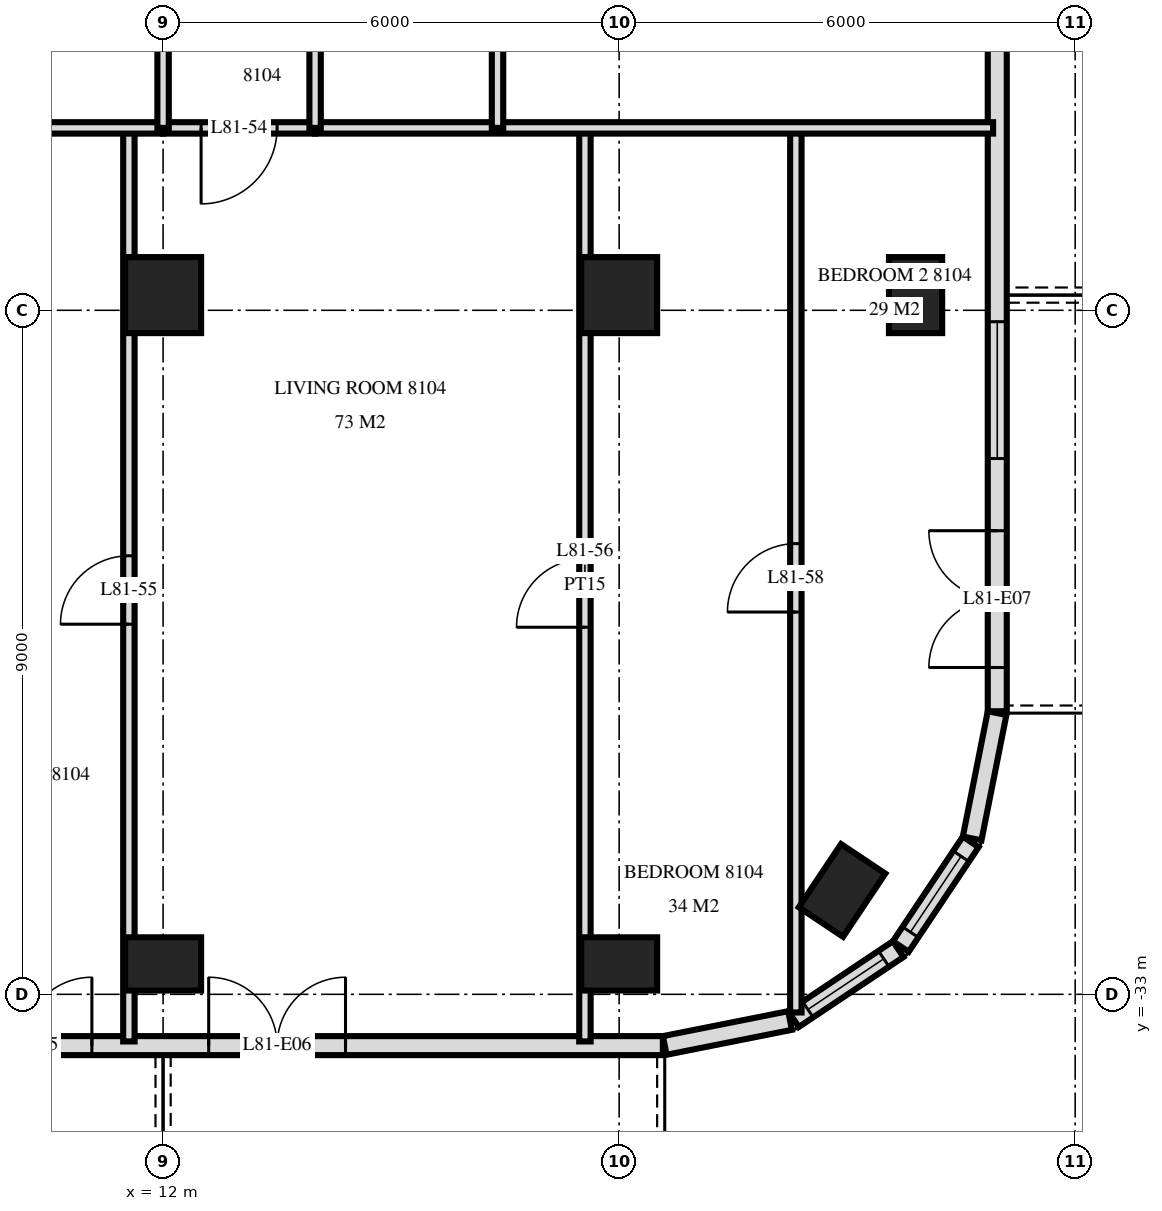
"""IFC4 building model, lengths in metres.
Left out: names, types, materials, properties, quantities, classifications, styles, units other than length and angle.
Written with IfcOpenShell. Run it as: python <this file> out.ifc"""

import sys

from ifc_helpers import new_model, si_unit, direction, frame, frame_2d, origin, origin_2d, place, context, subcontext, project, spatial, rectangle, extrude, element, fill, save


model = new_model("IFC4")
c1 = context("Model", 3, precision=1e-05, world=origin(), true_north=direction((0.0, 1.0)))
c2 = subcontext(c1, "Body", "Model", "MODEL_VIEW")
j1 = project(units=[si_unit("LENGTHUNIT", "METRE"), si_unit("PLANEANGLEUNIT", "RADIAN")], contexts=[c1])
p1 = place(None, origin())
s1 = spatial("IfcSite", under=j1, at=p1, CompositionType="ELEMENT")
p2 = place(p1, origin())
s2 = spatial("IfcBuilding", under=s1, at=p2, CompositionType="ELEMENT")
p3 = place(p2, frame((0.0, 0.0, 305.1)))
s3 = spatial("IfcBuildingStorey", under=s2, at=p3, CompositionType="ELEMENT", Elevation=305.1)
p4 = place(p3, frame((12.0, -32.6, 0.0), z_axis=(0.0, 0.0, 1.0), x_axis=(1.0, 0.0, 0.0)))
e1 = element("IfcColumn", 1, at=p4, inside=s3, PredefinedType="COLUMN", context=c2, shape_type="SweptSolid", body=[
    extrude(rectangle(XDim=1.0, YDim=0.7, at=origin_2d()), origin(), (0.0, 0.0, 1.0), 3.5),
])
p5 = place(p3, frame((12.0, -23.8, 0.0), z_axis=(0.0, 0.0, 1.0), x_axis=(1.0, 0.0, 0.0)))
e2 = element("IfcColumn", 2, at=p5, inside=s3, PredefinedType="COLUMN", context=c2, shape_type="SweptSolid", body=[
    extrude(rectangle(XDim=1.0, YDim=1.0, at=origin_2d()), origin(), (0.0, 0.0, 1.0), 3.5),
])
p6 = place(p3, frame((18.0, -32.6, 0.0), z_axis=(0.0, 0.0, 1.0), x_axis=(1.0, 0.0, 0.0)))
e3 = element("IfcColumn", 3, at=p6, inside=s3, PredefinedType="COLUMN", context=c2, shape_type="SweptSolid", body=[
    extrude(rectangle(XDim=1.0, YDim=0.7, at=origin_2d()), origin(), (0.0, 0.0, 1.0), 3.5),
])
p7 = place(p3, frame((18.0, -23.8, 0.0), z_axis=(0.0, 0.0, 1.0), x_axis=(1.0, 0.0, 0.0)))
e4 = element("IfcColumn", 4, at=p7, inside=s3, PredefinedType="COLUMN", context=c2, shape_type="SweptSolid", body=[
    extrude(rectangle(XDim=1.0, YDim=1.0, at=origin_2d()), origin(), (0.0, 0.0, 1.0), 3.5),
])
for number, where, z_axis, x_axis in (
    (5, (20.933, -31.633, 0.0), (0.0, 0.0, 1.0), (0.556, 0.831, 0.0)),
    (6, (21.9, -23.8, 0.0), (0.0, 0.0, 1.0), (0.0, 1.0, 0.0)),
):
    element("IfcColumn", number, at=place(p3, frame(where, z_axis=z_axis, x_axis=x_axis)), inside=s3, PredefinedType="COLUMN", context=c2, shape_type="SweptSolid", body=[
        extrude(rectangle(XDim=1.0, YDim=0.7, at=origin_2d()), origin(), (0.0, 0.0, 1.0), 3.5),
    ])
p8 = place(p3, frame((-18.575, -33.675, 0.0), z_axis=(0.0, 0.0, 1.0), x_axis=(1.0, 0.0, 0.0)))
e7 = element("IfcWall", 7, at=p8, inside=s3, PredefinedType="SOLIDWALL", context=c2, shape_type="SweptSolid", body=[
    extrude(rectangle(XDim=37.151, YDim=0.25, at=frame_2d((18.575, 0.0))), origin(), (0.0, 0.0, 1.0), 3.2),
])
p9 = place(p8, frame((1.175, 0.0, 0.0)))
e8 = element("IfcOpeningElement", 8, at=p9, cuts=e7, PredefinedType="OPENING", context=c2, shape_type="SweptSolid", body=[
    extrude(rectangle(XDim=1.8, YDim=2.4, at=frame_2d((0.9, 1.2))), frame((0.0, 0.135, 0.0), z_axis=(0.0, -1.0, 0.0), x_axis=(1.0, 0.0, 0.0)), (0.0, 0.0, 1.0), 0.27),
])
p10 = place(p8, frame((5.637, 0.0, 0.9)))
e9 = element("IfcOpeningElement", 9, at=p10, cuts=e7, PredefinedType="OPENING", context=c2, shape_type="SweptSolid", body=[
    extrude(rectangle(XDim=1.8, YDim=1.5, at=frame_2d((0.9, 0.75))), frame((0.0, 0.135, 0.0), z_axis=(0.0, -1.0, 0.0), x_axis=(1.0, 0.0, 0.0)), (0.0, 0.0, 1.0), 0.27),
])
p11 = place(p8, frame((7.663, 0.0, 0.0)))
e10 = element("IfcOpeningElement", 10, at=p11, cuts=e7, PredefinedType="OPENING", context=c2, shape_type="SweptSolid", body=[
    extrude(rectangle(XDim=1.8, YDim=2.4, at=frame_2d((0.9, 1.2))), frame((0.0, 0.135, 0.0), z_axis=(0.0, -1.0, 0.0), x_axis=(1.0, 0.0, 0.0)), (0.0, 0.0, 1.0), 0.27),
])
p12 = place(p8, frame((9.875, 0.0, 0.9)))
e11 = element("IfcOpeningElement", 11, at=p12, cuts=e7, PredefinedType="OPENING", context=c2, shape_type="SweptSolid", body=[
    extrude(rectangle(XDim=2.4, YDim=1.5, at=frame_2d((1.2, 0.75))), frame((0.0, 0.135, 0.0), z_axis=(0.0, -1.0, 0.0), x_axis=(1.0, 0.0, 0.0)), (0.0, 0.0, 1.0), 0.27),
])
p13 = place(p8, frame((13.175, 0.0, 0.0)))
e12 = element("IfcOpeningElement", 12, at=p13, cuts=e7, PredefinedType="OPENING", context=c2, shape_type="SweptSolid", body=[
    extrude(rectangle(XDim=1.8, YDim=2.4, at=frame_2d((0.9, 1.2))), frame((0.0, 0.135, 0.0), z_axis=(0.0, -1.0, 0.0), x_axis=(1.0, 0.0, 0.0)), (0.0, 0.0, 1.0), 0.27),
])
p14 = place(p8, frame((15.875, 0.0, 0.9)))
e13 = element("IfcOpeningElement", 13, at=p14, cuts=e7, PredefinedType="OPENING", context=c2, shape_type="SweptSolid", body=[
    extrude(rectangle(XDim=2.4, YDim=1.5, at=frame_2d((1.2, 0.75))), frame((0.0, 0.135, 0.0), z_axis=(0.0, -1.0, 0.0), x_axis=(1.0, 0.0, 0.0)), (0.0, 0.0, 1.0), 0.27),
])
p15 = place(p8, frame((19.175, 0.0, 0.0)))
e14 = element("IfcOpeningElement", 14, at=p15, cuts=e7, PredefinedType="OPENING", context=c2, shape_type="SweptSolid", body=[
    extrude(rectangle(XDim=1.8, YDim=2.4, at=frame_2d((0.9, 1.2))), frame((0.0, 0.135, 0.0), z_axis=(0.0, -1.0, 0.0), x_axis=(1.0, 0.0, 0.0)), (0.0, 0.0, 1.0), 0.27),
])
p16 = place(p8, frame((21.875, 0.0, 0.9)))
e15 = element("IfcOpeningElement", 15, at=p16, cuts=e7, PredefinedType="OPENING", context=c2, shape_type="SweptSolid", body=[
    extrude(rectangle(XDim=2.4, YDim=1.5, at=frame_2d((1.2, 0.75))), frame((0.0, 0.135, 0.0), z_axis=(0.0, -1.0, 0.0), x_axis=(1.0, 0.0, 0.0)), (0.0, 0.0, 1.0), 0.27),
])
p17 = place(p8, frame((25.063, 0.0, 0.9)))
e16 = element("IfcOpeningElement", 16, at=p17, cuts=e7, PredefinedType="OPENING", context=c2, shape_type="SweptSolid", body=[
    extrude(rectangle(XDim=1.8, YDim=1.5, at=frame_2d((0.9, 0.75))), frame((0.0, 0.135, 0.0), z_axis=(0.0, -1.0, 0.0), x_axis=(1.0, 0.0, 0.0)), (0.0, 0.0, 1.0), 0.27),
])
p18 = place(p8, frame((27.838, 0.0, 0.0)))
e17 = element("IfcOpeningElement", 17, at=p18, cuts=e7, PredefinedType="OPENING", context=c2, shape_type="SweptSolid", body=[
    extrude(rectangle(XDim=1.8, YDim=2.4, at=frame_2d((0.9, 1.2))), frame((0.0, 0.135, 0.0), z_axis=(0.0, -1.0, 0.0), x_axis=(1.0, 0.0, 0.0)), (0.0, 0.0, 1.0), 0.27),
])
p19 = place(p8, frame((31.175, 0.0, 0.0)))
e18 = element("IfcOpeningElement", 18, at=p19, cuts=e7, PredefinedType="OPENING", context=c2, shape_type="SweptSolid", body=[
    extrude(rectangle(XDim=1.8, YDim=2.4, at=frame_2d((0.9, 1.2))), frame((0.0, 0.135, 0.0), z_axis=(0.0, -1.0, 0.0), x_axis=(1.0, 0.0, 0.0)), (0.0, 0.0, 1.0), 0.27),
])
p20 = place(p3, frame((18.6, -33.673, 0.0), z_axis=(0.0, 0.0, 1.0), x_axis=(0.980770110232, 0.195166572128, 0.0)))
e19 = element("IfcWall", 19, at=p20, inside=s3, PredefinedType="SOLIDWALL", context=c2, shape_type="SweptSolid", body=[
    extrude(rectangle(XDim=1.681, YDim=0.25, at=frame_2d((0.841, 0.0))), origin(), (0.0, 0.0, 1.0), 3.2),
])
p21 = place(p3, frame((20.294, -33.326, 0.0), z_axis=(0.0, 0.0, 1.0), x_axis=(0.831482937015, 0.55555029066, 0.0)))
e20 = element("IfcWall", 20, at=p21, inside=s3, PredefinedType="SOLIDWALL", context=c2, shape_type="SweptSolid", body=[
    extrude(rectangle(XDim=1.656, YDim=0.25, at=frame_2d((0.828, 0.0))), origin(), (0.0, 0.0, 1.0), 3.2),
])
p22 = place(p21, frame((0.228, 0.0, 0.9)))
e21 = element("IfcOpeningElement", 21, at=p22, cuts=e20, PredefinedType="OPENING", context=c2, shape_type="SweptSolid", body=[
    extrude(rectangle(XDim=1.2, YDim=1.5, at=frame_2d((0.6, 0.75))), frame((0.0, 0.135, 0.0), z_axis=(0.0, -1.0, 0.0), x_axis=(1.0, 0.0, 0.0)), (0.0, 0.0, 1.0), 0.27),
])
p23 = place(p3, frame((21.706, -32.371, 0.0), z_axis=(0.0, 0.0, 1.0), x_axis=(0.55555029066, 0.831482937015, 0.0)))
e22 = element("IfcWall", 22, at=p23, inside=s3, PredefinedType="SOLIDWALL", context=c2, shape_type="SweptSolid", body=[
    extrude(rectangle(XDim=1.656, YDim=0.25, at=frame_2d((0.828, 0.0))), origin(), (0.0, 0.0, 1.0), 3.2),
])
p24 = place(p23, frame((0.228, 0.0, 0.9)))
e23 = element("IfcOpeningElement", 23, at=p24, cuts=e22, PredefinedType="OPENING", context=c2, shape_type="SweptSolid", body=[
    extrude(rectangle(XDim=1.2, YDim=1.5, at=frame_2d((0.6, 0.75))), frame((0.0, 0.135, 0.0), z_axis=(0.0, -1.0, 0.0), x_axis=(1.0, 0.0, 0.0)), (0.0, 0.0, 1.0), 0.27),
])
p25 = place(p3, frame((22.645, -30.949, 0.0), z_axis=(0.0, 0.0, 1.0), x_axis=(0.19513878023, 0.980775640221, 0.0)))
e24 = element("IfcWall", 24, at=p25, inside=s3, PredefinedType="SOLIDWALL", context=c2, shape_type="SweptSolid", body=[
    extrude(rectangle(XDim=1.681, YDim=0.25, at=frame_2d((0.841, 0.0))), origin(), (0.0, 0.0, 1.0), 3.2),
])
p26 = place(p3, frame((22.975, -29.275, 0.0), z_axis=(0.0, 0.0, 1.0), x_axis=(0.0, 1.0, 0.0)))
e25 = element("IfcWall", 25, at=p26, inside=s3, PredefinedType="SOLIDWALL", context=c2, shape_type="SweptSolid", body=[
    extrude(rectangle(XDim=25.951, YDim=0.25, at=frame_2d((12.975, 0.0))), origin(), (0.0, 0.0, 1.0), 3.2),
])
p27 = place(p26, frame((0.575, 0.0, 0.0)))
e26 = element("IfcOpeningElement", 26, at=p27, cuts=e25, PredefinedType="OPENING", context=c2, shape_type="SweptSolid", body=[
    extrude(rectangle(XDim=1.8, YDim=2.4, at=frame_2d((0.9, 1.2))), frame((0.0, 0.135, 0.0), z_axis=(0.0, -1.0, 0.0), x_axis=(1.0, 0.0, 0.0)), (0.0, 0.0, 1.0), 0.27),
])
p28 = place(p26, frame((3.325, 0.0, 0.9)))
e27 = element("IfcOpeningElement", 27, at=p28, cuts=e25, PredefinedType="OPENING", context=c2, shape_type="SweptSolid", body=[
    extrude(rectangle(XDim=1.8, YDim=1.5, at=frame_2d((0.9, 0.75))), frame((0.0, 0.135, 0.0), z_axis=(0.0, -1.0, 0.0), x_axis=(1.0, 0.0, 0.0)), (0.0, 0.0, 1.0), 0.27),
])
p29 = place(p26, frame((8.875, 0.0, 0.0)))
e28 = element("IfcOpeningElement", 28, at=p29, cuts=e25, PredefinedType="OPENING", context=c2, shape_type="SweptSolid", body=[
    extrude(rectangle(XDim=1.8, YDim=2.4, at=frame_2d((0.9, 1.2))), frame((0.0, 0.135, 0.0), z_axis=(0.0, -1.0, 0.0), x_axis=(1.0, 0.0, 0.0)), (0.0, 0.0, 1.0), 0.27),
])
p30 = place(p26, frame((12.475, 0.0, 0.9)))
e29 = element("IfcOpeningElement", 29, at=p30, cuts=e25, PredefinedType="OPENING", context=c2, shape_type="SweptSolid", body=[
    extrude(rectangle(XDim=1.2, YDim=1.5, at=frame_2d((0.6, 0.75))), frame((0.0, 0.135, 0.0), z_axis=(0.0, -1.0, 0.0), x_axis=(1.0, 0.0, 0.0)), (0.0, 0.0, 1.0), 0.27),
])
p31 = place(p26, frame((16.175, 0.0, 0.0)))
e30 = element("IfcOpeningElement", 30, at=p31, cuts=e25, PredefinedType="OPENING", context=c2, shape_type="SweptSolid", body=[
    extrude(rectangle(XDim=1.8, YDim=2.4, at=frame_2d((0.9, 1.2))), frame((0.0, 0.135, 0.0), z_axis=(0.0, -1.0, 0.0), x_axis=(1.0, 0.0, 0.0)), (0.0, 0.0, 1.0), 0.27),
])
p32 = place(p26, frame((22.425, 0.0, 0.0)))
e31 = element("IfcOpeningElement", 31, at=p32, cuts=e25, PredefinedType="OPENING", context=c2, shape_type="SweptSolid", body=[
    extrude(rectangle(XDim=1.8, YDim=2.4, at=frame_2d((0.9, 1.2))), frame((0.0, 0.135, 0.0), z_axis=(0.0, -1.0, 0.0), x_axis=(1.0, 0.0, 0.0)), (0.0, 0.0, 1.0), 0.27),
])
p33 = place(p3, frame((20.325, -33.239, 0.0), z_axis=(0.0, 0.0, 1.0), x_axis=(0.0, 1.0, 0.0)))
e32 = element("IfcWall", 32, at=p33, inside=s3, PredefinedType="PARTITIONING", context=c2, shape_type="SweptSolid", body=[
    extrude(rectangle(XDim=11.639, YDim=0.15, at=frame_2d((5.819, 0.0))), origin(), (0.0, 0.0, 1.0), 3.22),
])
p34 = place(p33, frame((5.269, 0.0, 0.0)))
e33 = element("IfcOpeningElement", 33, at=p34, cuts=e32, PredefinedType="OPENING", context=c2, shape_type="SweptSolid", body=[
    extrude(rectangle(XDim=0.9, YDim=2.1, at=frame_2d((0.45, 1.05))), frame((0.0, 0.085, 0.0), z_axis=(0.0, -1.0, 0.0), x_axis=(1.0, 0.0, 0.0)), (0.0, 0.0, 1.0), 0.17),
])
p35 = place(p3, frame((17.55, -33.62, 0.0), z_axis=(0.0, 0.0, 1.0), x_axis=(0.0, 1.0, 0.0)))
e34 = element("IfcWall", 34, at=p35, inside=s3, PredefinedType="PARTITIONING", context=c2, shape_type="SweptSolid", body=[
    extrude(rectangle(XDim=12.02, YDim=0.15, at=frame_2d((6.01, 0.0))), origin(), (0.0, 0.0, 1.0), 3.22),
])
p36 = place(p35, frame((5.45, 0.0, 0.0)))
e35 = element("IfcOpeningElement", 35, at=p36, cuts=e34, PredefinedType="OPENING", context=c2, shape_type="SweptSolid", body=[
    extrude(rectangle(XDim=0.9, YDim=2.1, at=frame_2d((0.45, 1.05))), frame((0.0, 0.085, 0.0), z_axis=(0.0, -1.0, 0.0), x_axis=(1.0, 0.0, 0.0)), (0.0, 0.0, 1.0), 0.17),
])
p37 = place(p3, frame((16.4, -21.6, 0.0), z_axis=(0.0, 0.0, 1.0), x_axis=(0.0, 1.0, 0.0)))
e36 = element("IfcWall", 36, at=p37, inside=s3, PredefinedType="PARTITIONING", context=c2, shape_type="SweptSolid", body=[
    extrude(rectangle(XDim=4.2, YDim=0.15, at=frame_2d((2.1, 0.0))), origin(), (0.0, 0.0, 1.0), 3.22),
])
p38 = place(p3, frame((14.0, -21.6, 0.0), z_axis=(0.0, 0.0, 1.0), x_axis=(0.0, 1.0, 0.0)))
e37 = element("IfcWall", 37, at=p38, inside=s3, PredefinedType="PARTITIONING", context=c2, shape_type="SweptSolid", body=[
    extrude(rectangle(XDim=4.2, YDim=0.15, at=frame_2d((2.1, 0.0))), origin(), (0.0, 0.0, 1.0), 3.22),
])
p39 = place(p38, frame((1.6, 0.0, 0.0)))
e38 = element("IfcOpeningElement", 38, at=p39, cuts=e37, PredefinedType="OPENING", context=c2, shape_type="SweptSolid", body=[
    extrude(rectangle(XDim=1.0, YDim=2.1, at=frame_2d((0.5, 1.05))), frame((0.0, 0.085, 0.0), z_axis=(0.0, -1.0, 0.0), x_axis=(1.0, 0.0, 0.0)), (0.0, 0.0, 1.0), 0.17),
])
p40 = place(p3, frame((12.0, -21.6, 0.0), z_axis=(0.0, 0.0, 1.0), x_axis=(0.0, 1.0, 0.0)))
e39 = element("IfcWall", 39, at=p40, inside=s3, PredefinedType="PARTITIONING", context=c2, shape_type="SweptSolid", body=[
    extrude(rectangle(XDim=4.2, YDim=0.15, at=frame_2d((2.1, 0.0))), origin(), (0.0, 0.0, 1.0), 3.22),
])
p41 = place(p40, frame((1.6, 0.0, 0.0)))
e40 = element("IfcOpeningElement", 40, at=p41, cuts=e39, PredefinedType="OPENING", context=c2, shape_type="SweptSolid", body=[
    extrude(rectangle(XDim=1.0, YDim=2.1, at=frame_2d((0.5, 1.05))), frame((0.0, 0.085, 0.0), z_axis=(0.0, -1.0, 0.0), x_axis=(1.0, 0.0, 0.0)), (0.0, 0.0, 1.0), 0.17),
])
p42 = place(p3, frame((11.55, -33.62, 0.0), z_axis=(0.0, 0.0, 1.0), x_axis=(0.0, 1.0, 0.0)))
e41 = element("IfcWall", 41, at=p42, inside=s3, PredefinedType="PARTITIONING", context=c2, shape_type="SweptSolid", body=[
    extrude(rectangle(XDim=12.02, YDim=0.15, at=frame_2d((6.01, 0.0))), origin(), (0.0, 0.0, 1.0), 3.22),
])
p43 = place(p42, frame((5.49, 0.0, 0.0)))
e42 = element("IfcOpeningElement", 42, at=p43, cuts=e41, PredefinedType="OPENING", context=c2, shape_type="SweptSolid", body=[
    extrude(rectangle(XDim=0.9, YDim=2.1, at=frame_2d((0.45, 1.05))), frame((0.0, 0.085, 0.0), z_axis=(0.0, -1.0, 0.0), x_axis=(1.0, 0.0, 0.0)), (0.0, 0.0, 1.0), 0.17),
])
p44 = place(p3, frame((12.0, -21.6, 0.0), z_axis=(0.0, 0.0, 1.0), x_axis=(1.0, 0.0, 0.0)))
e43 = element("IfcWall", 43, at=p44, inside=s3, PredefinedType="PARTITIONING", context=c2, shape_type="SweptSolid", body=[
    extrude(rectangle(XDim=2.0, YDim=0.15, at=frame_2d((1.0, 0.0))), origin(), (0.0, 0.0, 1.0), 3.22),
])
p45 = place(p44, frame((0.5, 0.0, 0.0)))
e44 = element("IfcOpeningElement", 44, at=p45, cuts=e43, PredefinedType="OPENING", context=c2, shape_type="SweptSolid", body=[
    extrude(rectangle(XDim=1.0, YDim=2.1, at=frame_2d((0.5, 1.05))), frame((0.0, 0.085, 0.0), z_axis=(0.0, -1.0, 0.0), x_axis=(1.0, 0.0, 0.0)), (0.0, 0.0, 1.0), 0.17),
])
p46 = place(p3, frame((6.0, -21.6, 0.0), z_axis=(0.0, 0.0, 1.0), x_axis=(1.0, 0.0, 0.0)))
e45 = element("IfcWall", 45, at=p46, inside=s3, PredefinedType="PARTITIONING", context=c2, shape_type="SweptSolid", body=[
    extrude(rectangle(XDim=6.0, YDim=0.15, at=frame_2d((3.0, 0.0))), origin(), (0.0, 0.0, 1.0), 3.22),
])
p47 = place(p46, frame((0.8, 0.0, 0.0)))
e46 = element("IfcOpeningElement", 46, at=p47, cuts=e45, PredefinedType="OPENING", context=c2, shape_type="SweptSolid", body=[
    extrude(rectangle(XDim=0.8, YDim=2.1, at=frame_2d((0.4, 1.05))), frame((0.0, 0.085, 0.0), z_axis=(0.0, -1.0, 0.0), x_axis=(1.0, 0.0, 0.0)), (0.0, 0.0, 1.0), 0.17),
])
p48 = place(p3, frame((14.0, -21.6, 0.0), z_axis=(0.0, 0.0, 1.0), x_axis=(1.0, 0.0, 0.0)))
e47 = element("IfcWall", 47, at=p48, inside=s3, PredefinedType="PARTITIONING", context=c2, shape_type="SweptSolid", body=[
    extrude(rectangle(XDim=8.92, YDim=0.15, at=frame_2d((4.46, 0.0))), origin(), (0.0, 0.0, 1.0), 3.22),
])
p49 = place(p22, origin())
e48 = element("IfcWindow", 48, at=p49, inside=s3, PartitioningType="SINGLE_PANEL", PredefinedType="WINDOW", context=c2, shape_type="SweptSolid", body=[
    extrude(rectangle(XDim=1.2, YDim=1.5, at=frame_2d((0.6, 0.75))), frame((0.0, 0.03, 0.0), z_axis=(0.0, -1.0, 0.0), x_axis=(1.0, 0.0, 0.0)), (0.0, 0.0, 1.0), 0.06),
])
fill(e21, e48)
p50 = place(p24, origin())
e49 = element("IfcWindow", 49, at=p50, inside=s3, PartitioningType="SINGLE_PANEL", PredefinedType="WINDOW", context=c2, shape_type="SweptSolid", body=[
    extrude(rectangle(XDim=1.2, YDim=1.5, at=frame_2d((0.6, 0.75))), frame((0.0, 0.03, 0.0), z_axis=(0.0, -1.0, 0.0), x_axis=(1.0, 0.0, 0.0)), (0.0, 0.0, 1.0), 0.06),
])
fill(e23, e49)
p51 = place(p18, origin())
e50 = element("IfcDoor", 50, at=p51, inside=s3, OperationType="DOUBLE_DOOR_SINGLE_SWING", PredefinedType="DOOR", context=c2, shape_type="SweptSolid", body=[
    extrude(rectangle(XDim=1.8, YDim=2.4, at=frame_2d((0.9, 1.2))), frame((0.0, 0.025, 0.0), z_axis=(0.0, -1.0, 0.0), x_axis=(1.0, 0.0, 0.0)), (0.0, 0.0, 1.0), 0.05),
])
fill(e17, e50)
p52 = place(p19, origin())
e51 = element("IfcDoor", 51, at=p52, inside=s3, OperationType="DOUBLE_DOOR_SINGLE_SWING", PredefinedType="DOOR", context=c2, shape_type="SweptSolid", body=[
    extrude(rectangle(XDim=1.8, YDim=2.4, at=frame_2d((0.9, 1.2))), frame((0.0, 0.025, 0.0), z_axis=(0.0, -1.0, 0.0), x_axis=(1.0, 0.0, 0.0)), (0.0, 0.0, 1.0), 0.05),
])
fill(e18, e51)
p53 = place(p27, origin())
e52 = element("IfcDoor", 52, at=p53, inside=s3, OperationType="DOUBLE_DOOR_SINGLE_SWING", PredefinedType="DOOR", context=c2, shape_type="SweptSolid", body=[
    extrude(rectangle(XDim=1.8, YDim=2.4, at=frame_2d((0.9, 1.2))), frame((0.0, 0.025, 0.0), z_axis=(0.0, -1.0, 0.0), x_axis=(1.0, 0.0, 0.0)), (0.0, 0.0, 1.0), 0.05),
])
fill(e26, e52)
p54 = place(p28, origin())
e53 = element("IfcWindow", 53, at=p54, inside=s3, PartitioningType="SINGLE_PANEL", PredefinedType="WINDOW", context=c2, shape_type="SweptSolid", body=[
    extrude(rectangle(XDim=1.8, YDim=1.5, at=frame_2d((0.9, 0.75))), frame((0.0, 0.03, 0.0), z_axis=(0.0, -1.0, 0.0), x_axis=(1.0, 0.0, 0.0)), (0.0, 0.0, 1.0), 0.06),
])
fill(e27, e53)
p55 = place(p45, frame((0.5, 0.0, 0.0), z_axis=(0.0, 0.0, 1.0), x_axis=(-1.0, 0.0, 0.0)))
e54 = element("IfcDoor", 54, at=p55, inside=s3, OperationType="SINGLE_SWING_LEFT", PredefinedType="DOOR", context=c2, shape_type="SweptSolid", body=[
    extrude(rectangle(XDim=1.0, YDim=2.1, at=frame_2d((0.0, 1.05))), frame((0.0, -0.025, 0.0), z_axis=(0.0, 1.0, 0.0), x_axis=(-1.0, 0.0, 0.0)), (0.0, 0.0, 1.0), 0.05),
])
fill(e44, e54)
p56 = place(p43, origin())
e55 = element("IfcDoor", 55, at=p56, inside=s3, OperationType="SINGLE_SWING_RIGHT", PredefinedType="DOOR", context=c2, shape_type="SweptSolid", body=[
    extrude(rectangle(XDim=0.9, YDim=2.1, at=frame_2d((0.45, 1.05))), frame((0.0, 0.025, 0.0), z_axis=(0.0, -1.0, 0.0), x_axis=(1.0, 0.0, 0.0)), (0.0, 0.0, 1.0), 0.05),
])
fill(e42, e55)
p57 = place(p36, origin())
e56 = element("IfcDoor", 56, at=p57, inside=s3, OperationType="SINGLE_SWING_RIGHT", PredefinedType="DOOR", context=c2, shape_type="SweptSolid", body=[
    extrude(rectangle(XDim=0.9, YDim=2.1, at=frame_2d((0.45, 1.05))), frame((0.0, 0.025, 0.0), z_axis=(0.0, -1.0, 0.0), x_axis=(1.0, 0.0, 0.0)), (0.0, 0.0, 1.0), 0.05),
])
fill(e35, e56)
p58 = place(p34, origin())
e57 = element("IfcDoor", 57, at=p58, inside=s3, OperationType="SINGLE_SWING_RIGHT", PredefinedType="DOOR", context=c2, shape_type="SweptSolid", body=[
    extrude(rectangle(XDim=0.9, YDim=2.1, at=frame_2d((0.45, 1.05))), frame((0.0, 0.025, 0.0), z_axis=(0.0, -1.0, 0.0), x_axis=(1.0, 0.0, 0.0)), (0.0, 0.0, 1.0), 0.05),
])
fill(e33, e57)
save(model, sys.argv[1])
